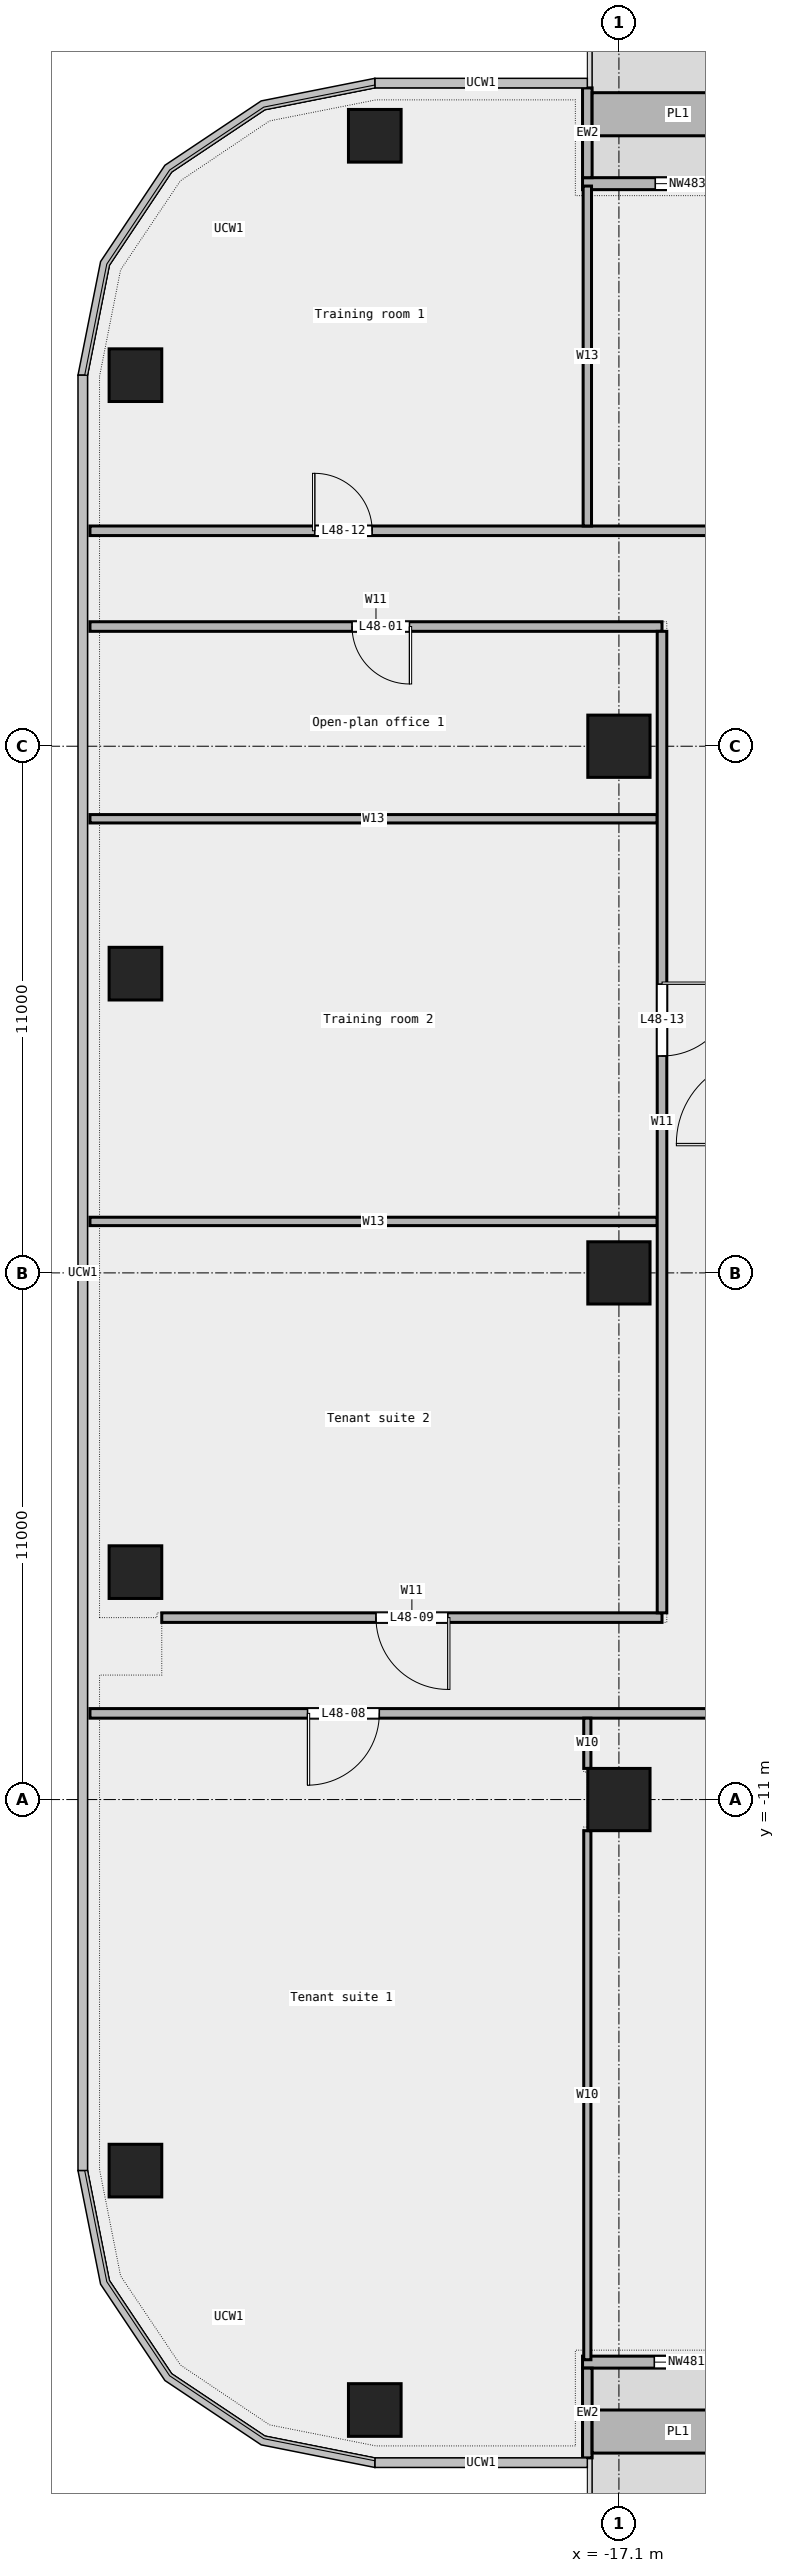
"""IFC4 building model, lengths in metres.
Left out: names, types, materials, properties, quantities, classifications, styles, units other than length and angle.
Written with IfcOpenShell. Run it as: python <this file> out.ifc"""

import sys

from ifc_helpers import new_model, si_unit, direction, frame, frame_2d, origin, origin_2d, place, context, subcontext, project, spatial, rectangle, extrude, element, fill, save


model = new_model("IFC4")
c1 = context("Model", 3, precision=1e-05, world=origin(), true_north=direction((0.0, 1.0)))
c2 = subcontext(c1, "Body", "Model", "MODEL_VIEW")
j1 = project(units=[si_unit("LENGTHUNIT", "METRE"), si_unit("PLANEANGLEUNIT", "RADIAN")], contexts=[c1])
p1 = place(None, origin())
s1 = spatial("IfcSite", under=j1, at=p1, CompositionType="ELEMENT")
p2 = place(p1, origin())
s2 = spatial("IfcBuilding", under=s1, at=p2, CompositionType="ELEMENT")
p3 = place(p2, frame((0.0, 0.0, 227.0)))
s3 = spatial("IfcBuildingStorey", under=s2, at=p3, CompositionType="ELEMENT", Elevation=227.0)
for number, where, z_axis, x_axis in (
    (1, (-22.2, -23.75, 0.0), (0.0, 0.0, 1.0), (1.0, 0.0, 0.0)),
    (2, (-22.2, 23.75, 0.0), (0.0, 0.0, 1.0), (1.0, 0.0, 0.0)),
    (3, (-27.2, 18.75, 0.0), (0.0, 0.0, 1.0), (1.0, 0.0, 0.0)),
    (4, (-27.2, 6.25, 0.0), (0.0, 0.0, 1.0), (1.0, 0.0, 0.0)),
    (5, (-27.2, -6.25, 0.0), (0.0, 0.0, 1.0), (1.0, 0.0, 0.0)),
    (6, (-27.2, -18.75, 0.0), (0.0, 0.0, 1.0), (1.0, 0.0, 0.0)),
):
    element("IfcColumn", number, at=place(p3, frame(where, z_axis=z_axis, x_axis=x_axis)), inside=s3, PredefinedType="COLUMN", context=c2, shape_type="SweptSolid", body=[
        extrude(rectangle(XDim=1.1, YDim=1.1, at=origin_2d()), origin(), (0.0, 0.0, 1.0), 3.6),
    ])
for number, where, z_axis, x_axis in (
    (7, (-17.1, -11.0, 0.0), (0.0, 0.0, 1.0), (1.0, 0.0, 0.0)),
    (8, (-17.1, 0.0, 0.0), (0.0, 0.0, 1.0), (1.0, 0.0, 0.0)),
    (9, (-17.1, 11.0, 0.0), (0.0, 0.0, 1.0), (1.0, 0.0, 0.0)),
):
    element("IfcColumn", number, at=place(p3, frame(where, z_axis=z_axis, x_axis=x_axis)), inside=s3, PredefinedType="COLUMN", context=c2, shape_type="SweptSolid", body=[
        extrude(rectangle(XDim=1.3, YDim=1.3, at=origin_2d()), origin(), (0.0, 0.0, 1.0), 3.6),
    ])
p4 = place(p3, frame((-17.86, -22.75, 0.0), z_axis=(0.0, 0.0, 1.0), x_axis=(1.0, 0.0, 0.0)))
e10 = element("IfcWall", 10, at=p4, inside=s3, PredefinedType="STANDARD", context=c2, shape_type="SweptSolid", body=[
    extrude(rectangle(XDim=13.52, YDim=0.25, at=frame_2d((6.76, 0.0))), origin(), (0.0, 0.0, 1.0), 3.6),
])
p5 = place(p4, frame((1.5, 0.0, 0.45)))
e11 = element("IfcOpeningElement", 11, at=p5, cuts=e10, PredefinedType="OPENING", context=c2, shape_type="SweptSolid", body=[
    extrude(rectangle(XDim=1.5, YDim=2.4, at=frame_2d((0.75, 1.2))), frame((0.0, 0.137, 0.0), z_axis=(0.0, -1.0, 0.0), x_axis=(1.0, 0.0, 0.0)), (0.0, 0.0, 1.0), 0.274),
])
p6 = place(p4, frame((4.0, 0.0, 0.0)))
e12 = element("IfcOpeningElement", 12, at=p6, cuts=e10, PredefinedType="OPENING", context=c2, shape_type="SweptSolid", body=[
    extrude(rectangle(XDim=1.8, YDim=2.4, at=frame_2d((0.9, 1.2))), frame((0.0, 0.137, 0.0), z_axis=(0.0, -1.0, 0.0), x_axis=(1.0, 0.0, 0.0)), (0.0, 0.0, 1.0), 0.274),
])
p7 = place(p4, frame((10.5, 0.0, 0.45)))
e13 = element("IfcOpeningElement", 13, at=p7, cuts=e10, PredefinedType="OPENING", context=c2, shape_type="SweptSolid", body=[
    extrude(rectangle(XDim=1.5, YDim=2.4, at=frame_2d((0.75, 1.2))), frame((0.0, 0.137, 0.0), z_axis=(0.0, -1.0, 0.0), x_axis=(1.0, 0.0, 0.0)), (0.0, 0.0, 1.0), 0.274),
])
p8 = place(p3, frame((-17.76, -24.75, 0.0), z_axis=(0.0, 0.0, 1.0), x_axis=(0.0, 1.0, 0.0)))
e14 = element("IfcWall", 14, at=p8, inside=s3, PredefinedType="STANDARD", context=c2, shape_type="SweptSolid", body=[
    extrude(rectangle(XDim=1.875, YDim=0.2, at=frame_2d((0.938, 0.0))), origin(), (0.0, 0.0, 1.0), 3.6),
])
p9 = place(p3, frame((-17.66, -24.2, 0.0), z_axis=(0.0, 0.0, 1.0), x_axis=(1.0, 0.0, 0.0)))
e15 = element("IfcWall", 15, at=p9, inside=s3, PredefinedType="STANDARD", context=c2, shape_type="SweptSolid", body=[
    extrude(rectangle(XDim=3.6, YDim=0.9, at=frame_2d((1.8, 0.0))), origin(), (0.0, 0.0, 1.0), 0.7),
])
p10 = place(p3, frame((-4.34, 22.75, 0.0), z_axis=(0.0, 0.0, 1.0), x_axis=(-1.0, 0.0, 0.0)))
e16 = element("IfcWall", 16, at=p10, inside=s3, PredefinedType="STANDARD", context=c2, shape_type="SweptSolid", body=[
    extrude(rectangle(XDim=13.52, YDim=0.25, at=frame_2d((6.76, 0.0))), origin(), (0.0, 0.0, 1.0), 3.6),
])
p11 = place(p10, frame((1.5, 0.0, 0.45)))
e17 = element("IfcOpeningElement", 17, at=p11, cuts=e16, PredefinedType="OPENING", context=c2, shape_type="SweptSolid", body=[
    extrude(rectangle(XDim=1.5, YDim=2.4, at=frame_2d((0.75, 1.2))), frame((0.0, 0.137, 0.0), z_axis=(0.0, -1.0, 0.0), x_axis=(1.0, 0.0, 0.0)), (0.0, 0.0, 1.0), 0.274),
])
p12 = place(p10, frame((4.0, 0.0, 0.0)))
e18 = element("IfcOpeningElement", 18, at=p12, cuts=e16, PredefinedType="OPENING", context=c2, shape_type="SweptSolid", body=[
    extrude(rectangle(XDim=1.8, YDim=2.4, at=frame_2d((0.9, 1.2))), frame((0.0, 0.137, 0.0), z_axis=(0.0, -1.0, 0.0), x_axis=(1.0, 0.0, 0.0)), (0.0, 0.0, 1.0), 0.274),
])
p13 = place(p10, frame((10.5, 0.0, 0.45)))
e19 = element("IfcOpeningElement", 19, at=p13, cuts=e16, PredefinedType="OPENING", context=c2, shape_type="SweptSolid", body=[
    extrude(rectangle(XDim=1.5, YDim=2.4, at=frame_2d((0.75, 1.2))), frame((0.0, 0.137, 0.0), z_axis=(0.0, -1.0, 0.0), x_axis=(1.0, 0.0, 0.0)), (0.0, 0.0, 1.0), 0.274),
])
p14 = place(p3, frame((-17.76, 24.75, 0.0), z_axis=(0.0, 0.0, 1.0), x_axis=(0.0, -1.0, 0.0)))
e20 = element("IfcWall", 20, at=p14, inside=s3, PredefinedType="STANDARD", context=c2, shape_type="SweptSolid", body=[
    extrude(rectangle(XDim=1.875, YDim=0.2, at=frame_2d((0.938, 0.0))), origin(), (0.0, 0.0, 1.0), 3.6),
])
p15 = place(p3, frame((-14.06, 24.2, 0.0), z_axis=(0.0, 0.0, 1.0), x_axis=(-1.0, 0.0, 0.0)))
e21 = element("IfcWall", 21, at=p15, inside=s3, PredefinedType="STANDARD", context=c2, shape_type="SweptSolid", body=[
    extrude(rectangle(XDim=3.6, YDim=0.9, at=frame_2d((1.8, 0.0))), origin(), (0.0, 0.0, 1.0), 0.7),
])
p16 = place(p3, frame((-28.15, -9.2, 0.0), z_axis=(0.0, 0.0, 1.0), x_axis=(1.0, 0.0, 0.0)))
e22 = element("IfcWall", 22, at=p16, inside=s3, PredefinedType="PARTITIONING", context=c2, shape_type="SweptSolid", body=[
    extrude(rectangle(XDim=54.3, YDim=0.2, at=frame_2d((27.15, 0.0))), origin(), (0.0, 0.0, 1.0), 3.6),
])
p17 = place(p16, frame((47.212, 0.0, 0.0)))
e23 = element("IfcOpeningElement", 23, at=p17, cuts=e22, PredefinedType="OPENING", context=c2, shape_type="SweptSolid", body=[
    extrude(rectangle(XDim=1.8, YDim=2.1, at=frame_2d((0.9, 1.05))), frame((0.0, 0.112, 0.0), z_axis=(0.0, -1.0, 0.0), x_axis=(1.0, 0.0, 0.0)), (0.0, 0.0, 1.0), 0.224),
])
p18 = place(p16, frame((16.15, 0.0, 0.0)))
e24 = element("IfcOpeningElement", 24, at=p18, cuts=e22, PredefinedType="OPENING", context=c2, shape_type="SweptSolid", body=[
    extrude(rectangle(XDim=1.8, YDim=2.1, at=frame_2d((0.9, 1.05))), frame((0.0, 0.112, 0.0), z_axis=(0.0, -1.0, 0.0), x_axis=(1.0, 0.0, 0.0)), (0.0, 0.0, 1.0), 0.224),
])
p19 = place(p16, frame((4.545, 0.0, 0.0)))
e25 = element("IfcOpeningElement", 25, at=p19, cuts=e22, PredefinedType="OPENING", context=c2, shape_type="SweptSolid", body=[
    extrude(rectangle(XDim=1.5, YDim=2.1, at=frame_2d((0.75, 1.05))), frame((0.0, 0.112, 0.0), z_axis=(0.0, -1.0, 0.0), x_axis=(1.0, 0.0, 0.0)), (0.0, 0.0, 1.0), 0.224),
])
p20 = place(p16, frame((31.117, 0.0, 0.0)))
e26 = element("IfcOpeningElement", 26, at=p20, cuts=e22, PredefinedType="OPENING", context=c2, shape_type="SweptSolid", body=[
    extrude(rectangle(XDim=1.8, YDim=2.1, at=frame_2d((0.9, 1.05))), frame((0.0, 0.112, 0.0), z_axis=(0.0, -1.0, 0.0), x_axis=(1.0, 0.0, 0.0)), (0.0, 0.0, 1.0), 0.224),
])
p21 = place(p3, frame((-26.65, -7.2, 0.0), z_axis=(0.0, 0.0, 1.0), x_axis=(1.0, 0.0, 0.0)))
e27 = element("IfcWall", 27, at=p21, inside=s3, PredefinedType="PARTITIONING", context=c2, shape_type="SweptSolid", body=[
    extrude(rectangle(XDim=10.45, YDim=0.2, at=frame_2d((5.225, 0.0))), origin(), (0.0, 0.0, 1.0), 3.6),
])
p22 = place(p21, frame((4.475, 0.0, 0.0)))
e28 = element("IfcOpeningElement", 28, at=p22, cuts=e27, PredefinedType="OPENING", context=c2, shape_type="SweptSolid", body=[
    extrude(rectangle(XDim=1.5, YDim=2.1, at=frame_2d((0.75, 1.05))), frame((0.0, 0.112, 0.0), z_axis=(0.0, -1.0, 0.0), x_axis=(1.0, 0.0, 0.0)), (0.0, 0.0, 1.0), 0.224),
])
for number, where, z_axis, x_axis in (
    (29, (-28.15, 1.075, 0.0), (0.0, 0.0, 1.0), (1.0, 0.0, 0.0)),
    (30, (-28.15, 9.485, 0.0), (0.0, 0.0, 1.0), (1.0, 0.0, 0.0)),
):
    element("IfcWall", number, at=place(p3, frame(where, z_axis=z_axis, x_axis=x_axis)), inside=s3, PredefinedType="PARTITIONING", context=c2, shape_type="SweptSolid", body=[
        extrude(rectangle(XDim=11.85, YDim=0.175, at=frame_2d((5.925, 0.0))), origin(), (0.0, 0.0, 1.0), 3.6),
    ])
p23 = place(p3, frame((-28.15, 13.5, 0.0), z_axis=(0.0, 0.0, 1.0), x_axis=(1.0, 0.0, 0.0)))
e31 = element("IfcWall", 31, at=p23, inside=s3, PredefinedType="PARTITIONING", context=c2, shape_type="SweptSolid", body=[
    extrude(rectangle(XDim=11.95, YDim=0.2, at=frame_2d((5.975, 0.0))), origin(), (0.0, 0.0, 1.0), 3.6),
])
p24 = place(p23, frame((5.475, 0.0, 0.0)))
e32 = element("IfcOpeningElement", 32, at=p24, cuts=e31, PredefinedType="OPENING", context=c2, shape_type="SweptSolid", body=[
    extrude(rectangle(XDim=1.2, YDim=2.1, at=frame_2d((0.6, 1.05))), frame((0.0, 0.112, 0.0), z_axis=(0.0, -1.0, 0.0), x_axis=(1.0, 0.0, 0.0)), (0.0, 0.0, 1.0), 0.224),
])
p25 = place(p3, frame((-28.15, 15.5, 0.0), z_axis=(0.0, 0.0, 1.0), x_axis=(1.0, 0.0, 0.0)))
e33 = element("IfcWall", 33, at=p25, inside=s3, PredefinedType="PARTITIONING", context=c2, shape_type="SweptSolid", body=[
    extrude(rectangle(XDim=56.3, YDim=0.2, at=frame_2d((28.15, 0.0))), origin(), (0.0, 0.0, 1.0), 3.6),
])
p26 = place(p25, frame((16.3, 0.0, 0.0)))
e34 = element("IfcOpeningElement", 34, at=p26, cuts=e33, PredefinedType="OPENING", context=c2, shape_type="SweptSolid", body=[
    extrude(rectangle(XDim=1.5, YDim=2.1, at=frame_2d((0.75, 1.05))), frame((0.0, 0.112, 0.0), z_axis=(0.0, -1.0, 0.0), x_axis=(1.0, 0.0, 0.0)), (0.0, 0.0, 1.0), 0.224),
])
p27 = place(p25, frame((46.225, 0.0, 0.0)))
e35 = element("IfcOpeningElement", 35, at=p27, cuts=e33, PredefinedType="OPENING", context=c2, shape_type="SweptSolid", body=[
    extrude(rectangle(XDim=1.8, YDim=2.1, at=frame_2d((0.9, 1.05))), frame((0.0, 0.112, 0.0), z_axis=(0.0, -1.0, 0.0), x_axis=(1.0, 0.0, 0.0)), (0.0, 0.0, 1.0), 0.224),
])
p28 = place(p25, frame((30.18, 0.0, 0.0)))
e36 = element("IfcOpeningElement", 36, at=p28, cuts=e33, PredefinedType="OPENING", context=c2, shape_type="SweptSolid", body=[
    extrude(rectangle(XDim=1.5, YDim=2.1, at=frame_2d((0.75, 1.05))), frame((0.0, 0.112, 0.0), z_axis=(0.0, -1.0, 0.0), x_axis=(1.0, 0.0, 0.0)), (0.0, 0.0, 1.0), 0.224),
])
p29 = place(p25, frame((4.695, 0.0, 0.0)))
e37 = element("IfcOpeningElement", 37, at=p29, cuts=e33, PredefinedType="OPENING", context=c2, shape_type="SweptSolid", body=[
    extrude(rectangle(XDim=1.2, YDim=2.1, at=frame_2d((0.6, 1.05))), frame((0.0, 0.112, 0.0), z_axis=(0.0, -1.0, 0.0), x_axis=(1.0, 0.0, 0.0)), (0.0, 0.0, 1.0), 0.224),
])
p30 = place(p3, frame((-17.76, -22.7, 0.0), z_axis=(0.0, 0.0, 1.0), x_axis=(0.0, 1.0, 0.0)))
e38 = element("IfcWall", 38, at=p30, inside=s3, PredefinedType="PARTITIONING", context=c2, shape_type="SweptSolid", body=[
    extrude(rectangle(XDim=11.05, YDim=0.15, at=frame_2d((5.525, 0.0))), origin(), (0.0, 0.0, 1.0), 3.6),
])
p31 = place(p3, frame((-17.76, -10.35, 0.0), z_axis=(0.0, 0.0, 1.0), x_axis=(0.0, 1.0, 0.0)))
e39 = element("IfcWall", 39, at=p31, inside=s3, PredefinedType="PARTITIONING", context=c2, shape_type="SweptSolid", body=[
    extrude(rectangle(XDim=1.05, YDim=0.15, at=frame_2d((0.525, 0.0))), origin(), (0.0, 0.0, 1.0), 3.6),
])
p32 = place(p3, frame((-17.76, 15.6, 0.0), z_axis=(0.0, 0.0, 1.0), x_axis=(0.0, 1.0, 0.0)))
e40 = element("IfcWall", 40, at=p32, inside=s3, PredefinedType="PARTITIONING", context=c2, shape_type="SweptSolid", body=[
    extrude(rectangle(XDim=7.1, YDim=0.175, at=frame_2d((3.55, 0.0))), origin(), (0.0, 0.0, 1.0), 3.6),
])
p33 = place(p3, frame((-16.2, -7.1, 0.0), z_axis=(0.0, 0.0, 1.0), x_axis=(0.0, 1.0, 0.0)))
e41 = element("IfcWall", 41, at=p33, inside=s3, PredefinedType="PARTITIONING", context=c2, shape_type="SweptSolid", body=[
    extrude(rectangle(XDim=20.5, YDim=0.2, at=frame_2d((10.25, 0.0))), origin(), (0.0, 0.0, 1.0), 3.6),
])
p34 = place(p33, frame((11.63, 0.0, 0.0)))
e42 = element("IfcOpeningElement", 42, at=p34, cuts=e41, PredefinedType="OPENING", context=c2, shape_type="SweptSolid", body=[
    extrude(rectangle(XDim=1.5, YDim=2.1, at=frame_2d((0.75, 1.05))), frame((0.0, 0.112, 0.0), z_axis=(0.0, -1.0, 0.0), x_axis=(1.0, 0.0, 0.0)), (0.0, 0.0, 1.0), 0.224),
])
p35 = place(p5, origin())
e43 = element("IfcWindow", 43, at=p35, inside=s3, PartitioningType="SINGLE_PANEL", PredefinedType="WINDOW", context=c2, shape_type="SweptSolid", body=[
    extrude(rectangle(XDim=1.5, YDim=2.4, at=frame_2d((0.75, 1.2))), frame((0.0, 0.03, 0.0), z_axis=(0.0, -1.0, 0.0), x_axis=(1.0, 0.0, 0.0)), (0.0, 0.0, 1.0), 0.06),
])
fill(e11, e43)
p36 = place(p13, origin())
e44 = element("IfcWindow", 44, at=p36, inside=s3, PartitioningType="SINGLE_PANEL", PredefinedType="WINDOW", context=c2, shape_type="SweptSolid", body=[
    extrude(rectangle(XDim=1.5, YDim=2.4, at=frame_2d((0.75, 1.2))), frame((0.0, 0.03, 0.0), z_axis=(0.0, -1.0, 0.0), x_axis=(1.0, 0.0, 0.0)), (0.0, 0.0, 1.0), 0.06),
])
fill(e19, e44)
p37 = place(p24, origin())
e45 = element("IfcDoor", 45, at=p37, inside=s3, OperationType="SINGLE_SWING_LEFT", PredefinedType="DOOR", context=c2, shape_type="SweptSolid", body=[
    extrude(rectangle(XDim=1.2, YDim=2.1, at=frame_2d((0.6, 1.05))), frame((0.0, 0.025, 0.0), z_axis=(0.0, -1.0, 0.0), x_axis=(1.0, 0.0, 0.0)), (0.0, 0.0, 1.0), 0.05),
])
fill(e32, e45)
p38 = place(p19, origin())
e46 = element("IfcDoor", 46, at=p38, inside=s3, OperationType="DOUBLE_DOOR_SINGLE_SWING", PredefinedType="DOOR", context=c2, shape_type="SweptSolid", body=[
    extrude(rectangle(XDim=1.5, YDim=2.1, at=frame_2d((0.75, 1.05))), frame((0.0, 0.025, 0.0), z_axis=(0.0, -1.0, 0.0), x_axis=(1.0, 0.0, 0.0)), (0.0, 0.0, 1.0), 0.05),
])
fill(e25, e46)
p39 = place(p22, origin())
e47 = element("IfcDoor", 47, at=p39, inside=s3, OperationType="DOUBLE_DOOR_SINGLE_SWING", PredefinedType="DOOR", context=c2, shape_type="SweptSolid", body=[
    extrude(rectangle(XDim=1.5, YDim=2.1, at=frame_2d((0.75, 1.05))), frame((0.0, 0.025, 0.0), z_axis=(0.0, -1.0, 0.0), x_axis=(1.0, 0.0, 0.0)), (0.0, 0.0, 1.0), 0.05),
])
fill(e28, e47)
p40 = place(p29, origin())
e48 = element("IfcDoor", 48, at=p40, inside=s3, OperationType="SINGLE_SWING_LEFT", PredefinedType="DOOR", context=c2, shape_type="SweptSolid", body=[
    extrude(rectangle(XDim=1.2, YDim=2.1, at=frame_2d((0.6, 1.05))), frame((0.0, 0.025, 0.0), z_axis=(0.0, -1.0, 0.0), x_axis=(1.0, 0.0, 0.0)), (0.0, 0.0, 1.0), 0.05),
])
fill(e37, e48)
p41 = place(p34, origin())
e49 = element("IfcDoor", 49, at=p41, inside=s3, OperationType="DOUBLE_DOOR_SINGLE_SWING", PredefinedType="DOOR", context=c2, shape_type="SweptSolid", body=[
    extrude(rectangle(XDim=1.5, YDim=2.1, at=frame_2d((0.75, 1.05))), frame((0.0, 0.025, 0.0), z_axis=(0.0, -1.0, 0.0), x_axis=(1.0, 0.0, 0.0)), (0.0, 0.0, 1.0), 0.05),
])
fill(e42, e49)
save(model, sys.argv[1])
